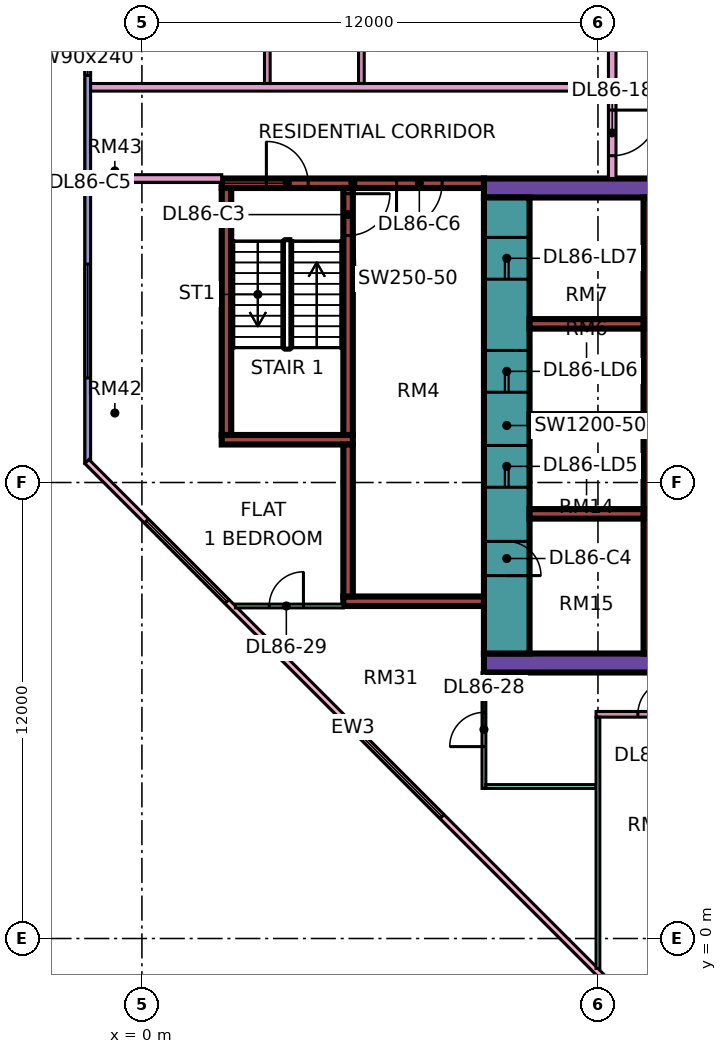
"""IFC4 building model, lengths in metres.
Left out: names, types, materials, properties, quantities, classifications, styles, units other than length and angle.
Written with IfcOpenShell. Run it as: python <this file> out.ifc"""

import sys

from ifc_helpers import new_model, si_unit, direction, frame, frame_2d, origin, place, context, subcontext, project, spatial, rectangle, extrude, element, fill, save


model = new_model("IFC4")
c1 = context("Model", 3, precision=1e-05, world=origin(), true_north=direction((0.0, 1.0)))
c2 = subcontext(c1, "Body", "Model", "MODEL_VIEW")
j1 = project(units=[si_unit("LENGTHUNIT", "METRE"), si_unit("PLANEANGLEUNIT", "RADIAN")], contexts=[c1])
p1 = place(None, origin())
s1 = spatial("IfcSite", under=j1, at=p1, CompositionType="ELEMENT")
p2 = place(p1, origin())
s2 = spatial("IfcBuilding", under=s1, at=p2, CompositionType="ELEMENT")
p3 = place(p2, frame((0.0, 0.0, 368.9)))
s3 = spatial("IfcBuildingStorey", under=s2, at=p3, CompositionType="ELEMENT", Elevation=368.9)
p4 = place(p3, frame((9.0, 7.25, 0.0), z_axis=(0.0, 0.0, 1.0), x_axis=(1.0, 0.0, 0.0)))
e1 = element("IfcWall", 1, at=p4, inside=s3, PredefinedType="SHEAR", context=c2, shape_type="SweptSolid", body=[
    extrude(rectangle(XDim=25.0, YDim=0.5, at=frame_2d((12.5, 0.0))), origin(), (0.0, 0.0, 1.0), 3.75),
])
p5 = place(p3, frame((9.0, 19.75, 0.0), z_axis=(0.0, 0.0, 1.0), x_axis=(1.0, 0.0, 0.0)))
e2 = element("IfcWall", 2, at=p5, inside=s3, PredefinedType="SHEAR", context=c2, shape_type="SweptSolid", body=[
    extrude(rectangle(XDim=25.0, YDim=0.5, at=frame_2d((12.5, 0.0))), origin(), (0.0, 0.0, 1.0), 3.75),
])
p6 = place(p5, frame((19.1, 0.0, 0.0)))
e3 = element("IfcOpeningElement", 3, at=p6, cuts=e2, PredefinedType="OPENING", context=c2, shape_type="SweptSolid", body=[
    extrude(rectangle(XDim=1.8, YDim=2.4, at=frame_2d((0.9, 1.2))), frame((0.0, 0.26, 0.0), z_axis=(0.0, -1.0, 0.0), x_axis=(1.0, 0.0, 0.0)), (0.0, 0.0, 1.0), 0.52),
])
p7 = place(p3, frame((9.6, 7.5, 0.0), z_axis=(0.0, 0.0, 1.0), x_axis=(0.0, 1.0, 0.0)))
e4 = element("IfcWall", 4, at=p7, inside=s3, PredefinedType="SHEAR", context=c2, shape_type="SweptSolid", body=[
    extrude(rectangle(XDim=12.0, YDim=1.2, at=frame_2d((6.0, 0.0))), origin(), (0.0, 0.0, 1.0), 3.75),
])
p8 = place(p7, frame((4.375, 0.0, 0.0)))
e5 = element("IfcOpeningElement", 5, at=p8, cuts=e4, PredefinedType="OPENING", context=c2, shape_type="SweptSolid", body=[
    extrude(rectangle(XDim=1.1, YDim=2.2, at=frame_2d((0.55, 1.1))), frame((0.0, 0.61, 0.0), z_axis=(0.0, -1.0, 0.0), x_axis=(1.0, 0.0, 0.0)), (0.0, 0.0, 1.0), 1.22),
])
p9 = place(p7, frame((6.875, 0.0, 0.0)))
e6 = element("IfcOpeningElement", 6, at=p9, cuts=e4, PredefinedType="OPENING", context=c2, shape_type="SweptSolid", body=[
    extrude(rectangle(XDim=1.1, YDim=2.2, at=frame_2d((0.55, 1.1))), frame((0.0, 0.61, 0.0), z_axis=(0.0, -1.0, 0.0), x_axis=(1.0, 0.0, 0.0)), (0.0, 0.0, 1.0), 1.22),
])
p10 = place(p7, frame((9.85, 0.0, 0.0)))
e7 = element("IfcOpeningElement", 7, at=p10, cuts=e4, PredefinedType="OPENING", context=c2, shape_type="SweptSolid", body=[
    extrude(rectangle(XDim=1.1, YDim=2.2, at=frame_2d((0.55, 1.1))), frame((0.0, 0.61, 0.0), z_axis=(0.0, -1.0, 0.0), x_axis=(1.0, 0.0, 0.0)), (0.0, 0.0, 1.0), 1.22),
])
p11 = place(p7, frame((2.05, 0.0, 0.0)))
e8 = element("IfcOpeningElement", 8, at=p11, cuts=e4, PredefinedType="OPENING", context=c2, shape_type="SweptSolid", body=[
    extrude(rectangle(XDim=0.9, YDim=2.1, at=frame_2d((0.45, 1.05))), frame((0.0, 0.61, 0.0), z_axis=(0.0, -1.0, 0.0), x_axis=(1.0, 0.0, 0.0)), (0.0, 0.0, 1.0), 1.22),
])
p12 = place(p3, frame((13.325, 7.5, 0.0), z_axis=(0.0, 0.0, 1.0), x_axis=(0.0, 1.0, 0.0)))
e9 = element("IfcWall", 9, at=p12, inside=s3, PredefinedType="SHEAR", context=c2, shape_type="SweptSolid", body=[
    extrude(rectangle(XDim=12.0, YDim=0.25, at=frame_2d((6.0, 0.0))), origin(), (0.0, 0.0, 1.0), 3.75),
])
for number, where, z_axis, x_axis in (
    (10, (10.2, 11.175, 0.0), (0.0, 0.0, 1.0), (1.0, 0.0, 0.0)),
    (11, (10.2, 13.675, 0.0), (0.0, 0.0, 1.0), (1.0, 0.0, 0.0)),
    (12, (10.2, 16.175, 0.0), (0.0, 0.0, 1.0), (1.0, 0.0, 0.0)),
):
    element("IfcWall", number, at=place(p3, frame(where, z_axis=z_axis, x_axis=x_axis)), inside=s3, PredefinedType="SHEAR", context=c2, shape_type="SweptSolid", body=[
        extrude(rectangle(XDim=3.0, YDim=0.25, at=frame_2d((1.5, 0.0))), origin(), (0.0, 0.0, 1.0), 3.75),
    ])
p13 = place(p3, frame((2.1, 19.875, 0.0), z_axis=(0.0, 0.0, 1.0), x_axis=(1.0, 0.0, 0.0)))
e13 = element("IfcWall", 13, at=p13, inside=s3, PredefinedType="SHEAR", context=c2, shape_type="SweptSolid", body=[
    extrude(rectangle(XDim=6.9, YDim=0.25, at=frame_2d((3.45, 0.0))), origin(), (0.0, 0.0, 1.0), 3.75),
])
p14 = place(p13, frame((1.175, 0.0, 0.0)))
e14 = element("IfcOpeningElement", 14, at=p14, cuts=e13, PredefinedType="OPENING", context=c2, shape_type="SweptSolid", body=[
    extrude(rectangle(XDim=1.1, YDim=2.2, at=frame_2d((0.55, 1.1))), frame((0.0, 0.135, 0.0), z_axis=(0.0, -1.0, 0.0), x_axis=(1.0, 0.0, 0.0)), (0.0, 0.0, 1.0), 0.27),
])
p15 = place(p13, frame((4.6, 0.0, 0.0)))
e15 = element("IfcOpeningElement", 15, at=p15, cuts=e13, PredefinedType="OPENING", context=c2, shape_type="SweptSolid", body=[
    extrude(rectangle(XDim=1.2, YDim=2.2, at=frame_2d((0.6, 1.1))), frame((0.0, 0.135, 0.0), z_axis=(0.0, -1.0, 0.0), x_axis=(1.0, 0.0, 0.0)), (0.0, 0.0, 1.0), 0.27),
])
p16 = place(p3, frame((2.1, 13.125, 0.0), z_axis=(0.0, 0.0, 1.0), x_axis=(1.0, 0.0, 0.0)))
e16 = element("IfcWall", 16, at=p16, inside=s3, PredefinedType="SHEAR", context=c2, shape_type="SweptSolid", body=[
    extrude(rectangle(XDim=3.45, YDim=0.25, at=frame_2d((1.725, 0.0))), origin(), (0.0, 0.0, 1.0), 3.75),
])
p17 = place(p3, frame((2.225, 13.25, 0.0), z_axis=(0.0, 0.0, 1.0), x_axis=(0.0, 1.0, 0.0)))
e17 = element("IfcWall", 17, at=p17, inside=s3, PredefinedType="SHEAR", context=c2, shape_type="SweptSolid", body=[
    extrude(rectangle(XDim=6.5, YDim=0.25, at=frame_2d((3.25, 0.0))), origin(), (0.0, 0.0, 1.0), 3.75),
])
p18 = place(p3, frame((5.425, 13.25, 0.0), z_axis=(0.0, 0.0, 1.0), x_axis=(0.0, 1.0, 0.0)))
e18 = element("IfcWall", 18, at=p18, inside=s3, PredefinedType="SHEAR", context=c2, shape_type="SweptSolid", body=[
    extrude(rectangle(XDim=6.5, YDim=0.25, at=frame_2d((3.25, 0.0))), origin(), (0.0, 0.0, 1.0), 3.75),
])
p19 = place(p18, frame((5.25, 0.0, 0.0)))
e19 = element("IfcOpeningElement", 19, at=p19, cuts=e18, PredefinedType="OPENING", context=c2, shape_type="SweptSolid", body=[
    extrude(rectangle(XDim=1.1, YDim=2.2, at=frame_2d((0.55, 1.1))), frame((0.0, 0.135, 0.0), z_axis=(0.0, -1.0, 0.0), x_axis=(1.0, 0.0, 0.0)), (0.0, 0.0, 1.0), 0.27),
])
p20 = place(p3, frame((5.3, 8.875, 0.0), z_axis=(0.0, 0.0, 1.0), x_axis=(1.0, 0.0, 0.0)))
e20 = element("IfcWall", 20, at=p20, inside=s3, PredefinedType="SHEAR", context=c2, shape_type="SweptSolid", body=[
    extrude(rectangle(XDim=3.7, YDim=0.25, at=frame_2d((1.85, 0.0))), origin(), (0.0, 0.0, 1.0), 3.75),
])
p21 = place(p3, frame((5.425, 9.0, 0.0), z_axis=(0.0, 0.0, 1.0), x_axis=(0.0, 1.0, 0.0)))
e21 = element("IfcWall", 21, at=p21, inside=s3, PredefinedType="SHEAR", context=c2, shape_type="SweptSolid", body=[
    extrude(rectangle(XDim=4.0, YDim=0.25, at=frame_2d((2.0, 0.0))), origin(), (0.0, 0.0, 1.0), 3.75),
])
p22 = place(p3, frame((-1.425, 23.925, 0.0), z_axis=(0.0, 0.0, 1.0), x_axis=(0.0, -1.0, 0.0)))
e22 = element("IfcWall", 22, at=p22, inside=s3, PredefinedType="SOLIDWALL", context=c2, shape_type="SweptSolid", body=[
    extrude(rectangle(XDim=11.425, YDim=0.15, at=frame_2d((5.712, 0.0))), origin(), (0.0, 0.0, 1.0), 3.35),
])
p23 = place(p22, frame((0.312, 0.0, 0.45)))
e23 = element("IfcOpeningElement", 23, at=p23, cuts=e22, PredefinedType="OPENING", context=c2, shape_type="SweptSolid", body=[
    extrude(rectangle(XDim=0.9, YDim=2.4, at=frame_2d((0.45, 1.2))), frame((0.0, 0.085, 0.0), z_axis=(0.0, -1.0, 0.0), x_axis=(1.0, 0.0, 0.0)), (0.0, 0.0, 1.0), 0.17),
])
p24 = place(p22, frame((6.175, 0.0, 0.45)))
e24 = element("IfcOpeningElement", 24, at=p24, cuts=e22, PredefinedType="OPENING", context=c2, shape_type="SweptSolid", body=[
    extrude(rectangle(XDim=3.0, YDim=2.4, at=frame_2d((1.5, 1.2))), frame((0.0, 0.085, 0.0), z_axis=(0.0, -1.0, 0.0), x_axis=(1.0, 0.0, 0.0)), (0.0, 0.0, 1.0), 0.17),
])
p25 = place(p3, frame((-1.447, 12.553, 0.0), z_axis=(0.0, 0.0, 1.0), x_axis=(0.707106781187, -0.707106781187, 0.0)))
e25 = element("IfcWall", 25, at=p25, inside=s3, PredefinedType="SOLIDWALL", context=c2, shape_type="SweptSolid", body=[
    extrude(rectangle(XDim=19.799, YDim=0.15, at=frame_2d((9.899, 0.0))), origin(), (0.0, 0.0, 1.0), 3.35),
])
p26 = place(p25, frame((2.212, 0.0, 0.45)))
e26 = element("IfcOpeningElement", 26, at=p26, cuts=e25, PredefinedType="OPENING", context=c2, shape_type="SweptSolid", body=[
    extrude(rectangle(XDim=3.0, YDim=2.4, at=frame_2d((1.5, 1.2))), frame((0.0, 0.085, 0.0), z_axis=(0.0, -1.0, 0.0), x_axis=(1.0, 0.0, 0.0)), (0.0, 0.0, 1.0), 0.17),
])
p27 = place(p25, frame((10.216, 0.0, 0.45)))
e27 = element("IfcOpeningElement", 27, at=p27, cuts=e25, PredefinedType="OPENING", context=c2, shape_type="SweptSolid", body=[
    extrude(rectangle(XDim=3.0, YDim=2.4, at=frame_2d((1.5, 1.2))), frame((0.0, 0.085, 0.0), z_axis=(0.0, -1.0, 0.0), x_axis=(1.0, 0.0, 0.0)), (0.0, 0.0, 1.0), 0.17),
])
p28 = place(p3, frame((-1.35, 20.0, 0.0), z_axis=(0.0, 0.0, 1.0), x_axis=(1.0, 0.0, 0.0)))
e28 = element("IfcWall", 28, at=p28, inside=s3, PredefinedType="PARTITIONING", context=c2, shape_type="SweptSolid", body=[
    extrude(rectangle(XDim=3.45, YDim=0.2, at=frame_2d((1.725, 0.0))), origin(), (0.0, 0.0, 1.0), 3.35),
])
p29 = place(p3, frame((-1.35, 22.4, 0.0), z_axis=(0.0, 0.0, 1.0), x_axis=(1.0, 0.0, 0.0)))
e29 = element("IfcWall", 29, at=p29, inside=s3, PredefinedType="PARTITIONING", context=c2, shape_type="SweptSolid", body=[
    extrude(rectangle(XDim=13.625, YDim=0.2, at=frame_2d((6.812, 0.0))), origin(), (0.0, 0.0, 1.0), 3.35),
])
p30 = place(p3, frame((2.461, 8.75, 0.0), z_axis=(0.0, 0.0, 1.0), x_axis=(1.0, 0.0, 0.0)))
e30 = element("IfcWall", 30, at=p30, inside=s3, PredefinedType="PARTITIONING", context=c2, shape_type="SweptSolid", body=[
    extrude(rectangle(XDim=2.839, YDim=0.1, at=frame_2d((1.419, 0.0))), origin(), (0.0, 0.0, 1.0), 3.35),
])
p31 = place(p30, frame((0.889, 0.0, 0.0)))
e31 = element("IfcOpeningElement", 31, at=p31, cuts=e30, PredefinedType="OPENING", context=c2, shape_type="SweptSolid", body=[
    extrude(rectangle(XDim=0.9, YDim=2.1, at=frame_2d((0.45, 1.05))), frame((0.0, 0.06, 0.0), z_axis=(0.0, -1.0, 0.0), x_axis=(1.0, 0.0, 0.0)), (0.0, 0.0, 1.0), 0.12),
])
p32 = place(p3, frame((3.3, 22.5, 0.0), z_axis=(0.0, 0.0, 1.0), x_axis=(0.0, 1.0, 0.0)))
e32 = element("IfcWall", 32, at=p32, inside=s3, PredefinedType="PARTITIONING", context=c2, shape_type="SweptSolid", body=[
    extrude(rectangle(XDim=2.975, YDim=0.15, at=frame_2d((1.488, 0.0))), origin(), (0.0, 0.0, 1.0), 3.35),
])
p33 = place(p32, frame((0.95, 0.0, 0.0)))
e33 = element("IfcOpeningElement", 33, at=p33, cuts=e32, PredefinedType="OPENING", context=c2, shape_type="SweptSolid", body=[
    extrude(rectangle(XDim=0.8, YDim=2.1, at=frame_2d((0.4, 1.05))), frame((0.0, 0.085, 0.0), z_axis=(0.0, -1.0, 0.0), x_axis=(1.0, 0.0, 0.0)), (0.0, 0.0, 1.0), 0.17),
])
p34 = place(p3, frame((5.775, 22.5, 0.0), z_axis=(0.0, 0.0, 1.0), x_axis=(0.0, 1.0, 0.0)))
e34 = element("IfcWall", 34, at=p34, inside=s3, PredefinedType="PARTITIONING", context=c2, shape_type="SweptSolid", body=[
    extrude(rectangle(XDim=7.55, YDim=0.15, at=frame_2d((3.775, 0.0))), origin(), (0.0, 0.0, 1.0), 3.35),
])
p35 = place(p3, frame((9.0, 3.95, 0.0), z_axis=(0.0, 0.0, 1.0), x_axis=(0.0, 1.0, 0.0)))
e35 = element("IfcWall", 35, at=p35, inside=s3, PredefinedType="PARTITIONING", context=c2, shape_type="SweptSolid", body=[
    extrude(rectangle(XDim=3.05, YDim=0.1, at=frame_2d((1.525, 0.0))), origin(), (0.0, 0.0, 1.0), 3.35),
])
p36 = place(p35, frame((1.1, 0.0, 0.0)))
e36 = element("IfcOpeningElement", 36, at=p36, cuts=e35, PredefinedType="OPENING", context=c2, shape_type="SweptSolid", body=[
    extrude(rectangle(XDim=0.9, YDim=2.1, at=frame_2d((0.45, 1.05))), frame((0.0, 0.06, 0.0), z_axis=(0.0, -1.0, 0.0), x_axis=(1.0, 0.0, 0.0)), (0.0, 0.0, 1.0), 0.12),
])
p37 = place(p3, frame((9.05, 4.0, 0.0), z_axis=(0.0, 0.0, 1.0), x_axis=(1.0, 0.0, 0.0)))
e37 = element("IfcWall", 37, at=p37, inside=s3, PredefinedType="PARTITIONING", context=c2, shape_type="SweptSolid", body=[
    extrude(rectangle(XDim=2.9, YDim=0.1, at=frame_2d((1.45, 0.0))), origin(), (0.0, 0.0, 1.0), 3.35),
])
p38 = place(p3, frame((11.95, 5.9, 0.0), z_axis=(0.0, 0.0, 1.0), x_axis=(1.0, 0.0, 0.0)))
e38 = element("IfcWall", 38, at=p38, inside=s3, PredefinedType="PARTITIONING", context=c2, shape_type="SweptSolid", body=[
    extrude(rectangle(XDim=21.1, YDim=0.15, at=frame_2d((10.55, 0.0))), origin(), (0.0, 0.0, 1.0), 3.35),
])
p39 = place(p38, frame((1.1, 0.0, 0.0)))
e39 = element("IfcOpeningElement", 39, at=p39, cuts=e38, PredefinedType="OPENING", context=c2, shape_type="SweptSolid", body=[
    extrude(rectangle(XDim=0.9, YDim=2.1, at=frame_2d((0.45, 1.05))), frame((0.0, 0.085, 0.0), z_axis=(0.0, -1.0, 0.0), x_axis=(1.0, 0.0, 0.0)), (0.0, 0.0, 1.0), 0.17),
])
p40 = place(p38, frame((10.1, 0.0, 0.0)))
e40 = element("IfcOpeningElement", 40, at=p40, cuts=e38, PredefinedType="OPENING", context=c2, shape_type="SweptSolid", body=[
    extrude(rectangle(XDim=0.9, YDim=2.1, at=frame_2d((0.45, 1.05))), frame((0.0, 0.085, 0.0), z_axis=(0.0, -1.0, 0.0), x_axis=(1.0, 0.0, 0.0)), (0.0, 0.0, 1.0), 0.17),
])
p41 = place(p38, frame((7.1, 0.0, 0.0)))
e41 = element("IfcOpeningElement", 41, at=p41, cuts=e38, PredefinedType="OPENING", context=c2, shape_type="SweptSolid", body=[
    extrude(rectangle(XDim=0.9, YDim=2.1, at=frame_2d((0.45, 1.05))), frame((0.0, 0.085, 0.0), z_axis=(0.0, -1.0, 0.0), x_axis=(1.0, 0.0, 0.0)), (0.0, 0.0, 1.0), 0.17),
])
p42 = place(p38, frame((16.1, 0.0, 0.0)))
e42 = element("IfcOpeningElement", 42, at=p42, cuts=e38, PredefinedType="OPENING", context=c2, shape_type="SweptSolid", body=[
    extrude(rectangle(XDim=0.9, YDim=2.1, at=frame_2d((0.45, 1.05))), frame((0.0, 0.085, 0.0), z_axis=(0.0, -1.0, 0.0), x_axis=(1.0, 0.0, 0.0)), (0.0, 0.0, 1.0), 0.17),
])
p43 = place(p3, frame((12.0, -0.788, 0.0), z_axis=(0.0, 0.0, 1.0), x_axis=(0.0, 1.0, 0.0)))
e43 = element("IfcWall", 43, at=p43, inside=s3, PredefinedType="PARTITIONING", context=c2, shape_type="SweptSolid", body=[
    extrude(rectangle(XDim=6.613, YDim=0.1, at=frame_2d((3.306, 0.0))), origin(), (0.0, 0.0, 1.0), 3.35),
])
p44 = place(p3, frame((12.375, 20.0, 0.0), z_axis=(0.0, 0.0, 1.0), x_axis=(0.0, 1.0, 0.0)))
e44 = element("IfcWall", 44, at=p44, inside=s3, PredefinedType="PARTITIONING", context=c2, shape_type="SweptSolid", body=[
    extrude(rectangle(XDim=34.0, YDim=0.2, at=frame_2d((17.0, 0.0))), origin(), (0.0, 0.0, 1.0), 3.35),
])
p45 = place(p44, frame((16.8, 0.0, 0.0)))
e45 = element("IfcOpeningElement", 45, at=p45, cuts=e44, PredefinedType="OPENING", context=c2, shape_type="SweptSolid", body=[
    extrude(rectangle(XDim=1.0, YDim=2.1, at=frame_2d((0.5, 1.05))), frame((0.0, 0.11, 0.0), z_axis=(0.0, -1.0, 0.0), x_axis=(1.0, 0.0, 0.0)), (0.0, 0.0, 1.0), 0.22),
])
p46 = place(p44, frame((0.6, 0.0, 0.0)))
e46 = element("IfcOpeningElement", 46, at=p46, cuts=e44, PredefinedType="OPENING", context=c2, shape_type="SweptSolid", body=[
    extrude(rectangle(XDim=1.2, YDim=2.1, at=frame_2d((0.6, 1.05))), frame((0.0, 0.11, 0.0), z_axis=(0.0, -1.0, 0.0), x_axis=(1.0, 0.0, 0.0)), (0.0, 0.0, 1.0), 0.22),
])
p47 = place(p44, frame((4.5, 0.0, 0.0)))
e47 = element("IfcOpeningElement", 47, at=p47, cuts=e44, PredefinedType="OPENING", context=c2, shape_type="SweptSolid", body=[
    extrude(rectangle(XDim=1.0, YDim=2.1, at=frame_2d((0.5, 1.05))), frame((0.0, 0.11, 0.0), z_axis=(0.0, -1.0, 0.0), x_axis=(1.0, 0.0, 0.0)), (0.0, 0.0, 1.0), 0.22),
])
p48 = place(p23, origin())
e48 = element("IfcWindow", 48, at=p48, inside=s3, PartitioningType="SINGLE_PANEL", PredefinedType="WINDOW", context=c2, shape_type="SweptSolid", body=[
    extrude(rectangle(XDim=0.9, YDim=2.4, at=frame_2d((0.45, 1.2))), frame((0.0, 0.03, 0.0), z_axis=(0.0, -1.0, 0.0), x_axis=(1.0, 0.0, 0.0)), (0.0, 0.0, 1.0), 0.06),
])
fill(e23, e48)
p49 = place(p24, origin())
e49 = element("IfcWindow", 49, at=p49, inside=s3, PartitioningType="SINGLE_PANEL", PredefinedType="WINDOW", context=c2, shape_type="SweptSolid", body=[
    extrude(rectangle(XDim=3.0, YDim=2.4, at=frame_2d((1.5, 1.2))), frame((0.0, 0.03, 0.0), z_axis=(0.0, -1.0, 0.0), x_axis=(1.0, 0.0, 0.0)), (0.0, 0.0, 1.0), 0.06),
])
fill(e24, e49)
p50 = place(p26, origin())
e50 = element("IfcWindow", 50, at=p50, inside=s3, PartitioningType="SINGLE_PANEL", PredefinedType="WINDOW", context=c2, shape_type="SweptSolid", body=[
    extrude(rectangle(XDim=3.0, YDim=2.4, at=frame_2d((1.5, 1.2))), frame((0.0, 0.03, 0.0), z_axis=(0.0, -1.0, 0.0), x_axis=(1.0, 0.0, 0.0)), (0.0, 0.0, 1.0), 0.06),
])
fill(e26, e50)
p51 = place(p27, origin())
e51 = element("IfcWindow", 51, at=p51, inside=s3, PartitioningType="SINGLE_PANEL", PredefinedType="WINDOW", context=c2, shape_type="SweptSolid", body=[
    extrude(rectangle(XDim=3.0, YDim=2.4, at=frame_2d((1.5, 1.2))), frame((0.0, 0.03, 0.0), z_axis=(0.0, -1.0, 0.0), x_axis=(1.0, 0.0, 0.0)), (0.0, 0.0, 1.0), 0.06),
])
fill(e27, e51)
p52 = place(p8, origin())
e52 = element("IfcDoor", 52, at=p52, inside=s3, OperationType="DOUBLE_DOOR_SLIDING", PredefinedType="DOOR", context=c2, shape_type="SweptSolid", body=[
    extrude(rectangle(XDim=1.1, YDim=2.2, at=frame_2d((0.55, 1.1))), frame((0.0, 0.025, 0.0), z_axis=(0.0, -1.0, 0.0), x_axis=(1.0, 0.0, 0.0)), (0.0, 0.0, 1.0), 0.05),
])
fill(e5, e52)
p53 = place(p9, origin())
e53 = element("IfcDoor", 53, at=p53, inside=s3, OperationType="DOUBLE_DOOR_SLIDING", PredefinedType="DOOR", context=c2, shape_type="SweptSolid", body=[
    extrude(rectangle(XDim=1.1, YDim=2.2, at=frame_2d((0.55, 1.1))), frame((0.0, 0.025, 0.0), z_axis=(0.0, -1.0, 0.0), x_axis=(1.0, 0.0, 0.0)), (0.0, 0.0, 1.0), 0.05),
])
fill(e6, e53)
p54 = place(p10, origin())
e54 = element("IfcDoor", 54, at=p54, inside=s3, OperationType="DOUBLE_DOOR_SLIDING", PredefinedType="DOOR", context=c2, shape_type="SweptSolid", body=[
    extrude(rectangle(XDim=1.1, YDim=2.2, at=frame_2d((0.55, 1.1))), frame((0.0, 0.025, 0.0), z_axis=(0.0, -1.0, 0.0), x_axis=(1.0, 0.0, 0.0)), (0.0, 0.0, 1.0), 0.05),
])
fill(e7, e54)
p55 = place(p19, origin())
e55 = element("IfcDoor", 55, at=p55, inside=s3, OperationType="SINGLE_SWING_RIGHT", PredefinedType="DOOR", context=c2, shape_type="SweptSolid", body=[
    extrude(rectangle(XDim=1.1, YDim=2.2, at=frame_2d((0.55, 1.1))), frame((0.0, 0.025, 0.0), z_axis=(0.0, -1.0, 0.0), x_axis=(1.0, 0.0, 0.0)), (0.0, 0.0, 1.0), 0.05),
])
fill(e19, e55)
p56 = place(p11, frame((0.9, 0.0, 0.0), z_axis=(0.0, 0.0, 1.0), x_axis=(-1.0, 0.0, 0.0)))
e56 = element("IfcDoor", 56, at=p56, inside=s3, OperationType="SINGLE_SWING_LEFT", PredefinedType="DOOR", context=c2, shape_type="SweptSolid", body=[
    extrude(rectangle(XDim=0.9, YDim=2.1, at=frame_2d((0.45, 1.05))), frame((0.0, 0.025, 0.0), z_axis=(0.0, -1.0, 0.0), x_axis=(1.0, 0.0, 0.0)), (0.0, 0.0, 1.0), 0.05),
])
fill(e8, e56)
p57 = place(p14, origin())
e57 = element("IfcDoor", 57, at=p57, inside=s3, OperationType="SINGLE_SWING_LEFT", PredefinedType="DOOR", context=c2, shape_type="SweptSolid", body=[
    extrude(rectangle(XDim=1.1, YDim=2.2, at=frame_2d((0.55, 1.1))), frame((0.0, 0.025, 0.0), z_axis=(0.0, -1.0, 0.0), x_axis=(1.0, 0.0, 0.0)), (0.0, 0.0, 1.0), 0.05),
])
fill(e14, e57)
p58 = place(p15, frame((1.2, 0.0, 0.0), z_axis=(0.0, 0.0, 1.0), x_axis=(-1.0, 0.0, 0.0)))
e58 = element("IfcDoor", 58, at=p58, inside=s3, OperationType="SINGLE_SWING_LEFT", PredefinedType="DOOR", context=c2, shape_type="SweptSolid", body=[
    extrude(rectangle(XDim=1.2, YDim=2.2, at=frame_2d((0.6, 1.1))), frame((0.0, 0.025, 0.0), z_axis=(0.0, -1.0, 0.0), x_axis=(1.0, 0.0, 0.0)), (0.0, 0.0, 1.0), 0.05),
])
fill(e15, e58)
p59 = place(p46, origin())
e59 = element("IfcDoor", 59, at=p59, inside=s3, OperationType="SINGLE_SWING_RIGHT", PredefinedType="DOOR", context=c2, shape_type="SweptSolid", body=[
    extrude(rectangle(XDim=1.2, YDim=2.1, at=frame_2d((0.6, 1.05))), frame((0.0, 0.025, 0.0), z_axis=(0.0, -1.0, 0.0), x_axis=(1.0, 0.0, 0.0)), (0.0, 0.0, 1.0), 0.05),
])
fill(e46, e59)
p60 = place(p39, frame((0.9, 0.0, 0.0), z_axis=(0.0, 0.0, 1.0), x_axis=(-1.0, 0.0, 0.0)))
e60 = element("IfcDoor", 60, at=p60, inside=s3, OperationType="SINGLE_SWING_RIGHT", PredefinedType="DOOR", context=c2, shape_type="SweptSolid", body=[
    extrude(rectangle(XDim=0.9, YDim=2.1, at=frame_2d((0.45, 1.05))), frame((0.0, 0.025, 0.0), z_axis=(0.0, -1.0, 0.0), x_axis=(1.0, 0.0, 0.0)), (0.0, 0.0, 1.0), 0.05),
])
fill(e39, e60)
p61 = place(p36, origin())
e61 = element("IfcDoor", 61, at=p61, inside=s3, OperationType="SINGLE_SWING_LEFT", PredefinedType="DOOR", context=c2, shape_type="SweptSolid", body=[
    extrude(rectangle(XDim=0.9, YDim=2.1, at=frame_2d((0.45, 1.05))), frame((0.0, 0.025, 0.0), z_axis=(0.0, -1.0, 0.0), x_axis=(1.0, 0.0, 0.0)), (0.0, 0.0, 1.0), 0.05),
])
fill(e36, e61)
p62 = place(p31, frame((0.9, 0.0, 0.0), z_axis=(0.0, 0.0, 1.0), x_axis=(-1.0, 0.0, 0.0)))
e62 = element("IfcDoor", 62, at=p62, inside=s3, OperationType="SINGLE_SWING_RIGHT", PredefinedType="DOOR", context=c2, shape_type="SweptSolid", body=[
    extrude(rectangle(XDim=0.9, YDim=2.1, at=frame_2d((0.45, 1.05))), frame((0.0, 0.025, 0.0), z_axis=(0.0, -1.0, 0.0), x_axis=(1.0, 0.0, 0.0)), (0.0, 0.0, 1.0), 0.05),
])
fill(e31, e62)
save(model, sys.argv[1])
